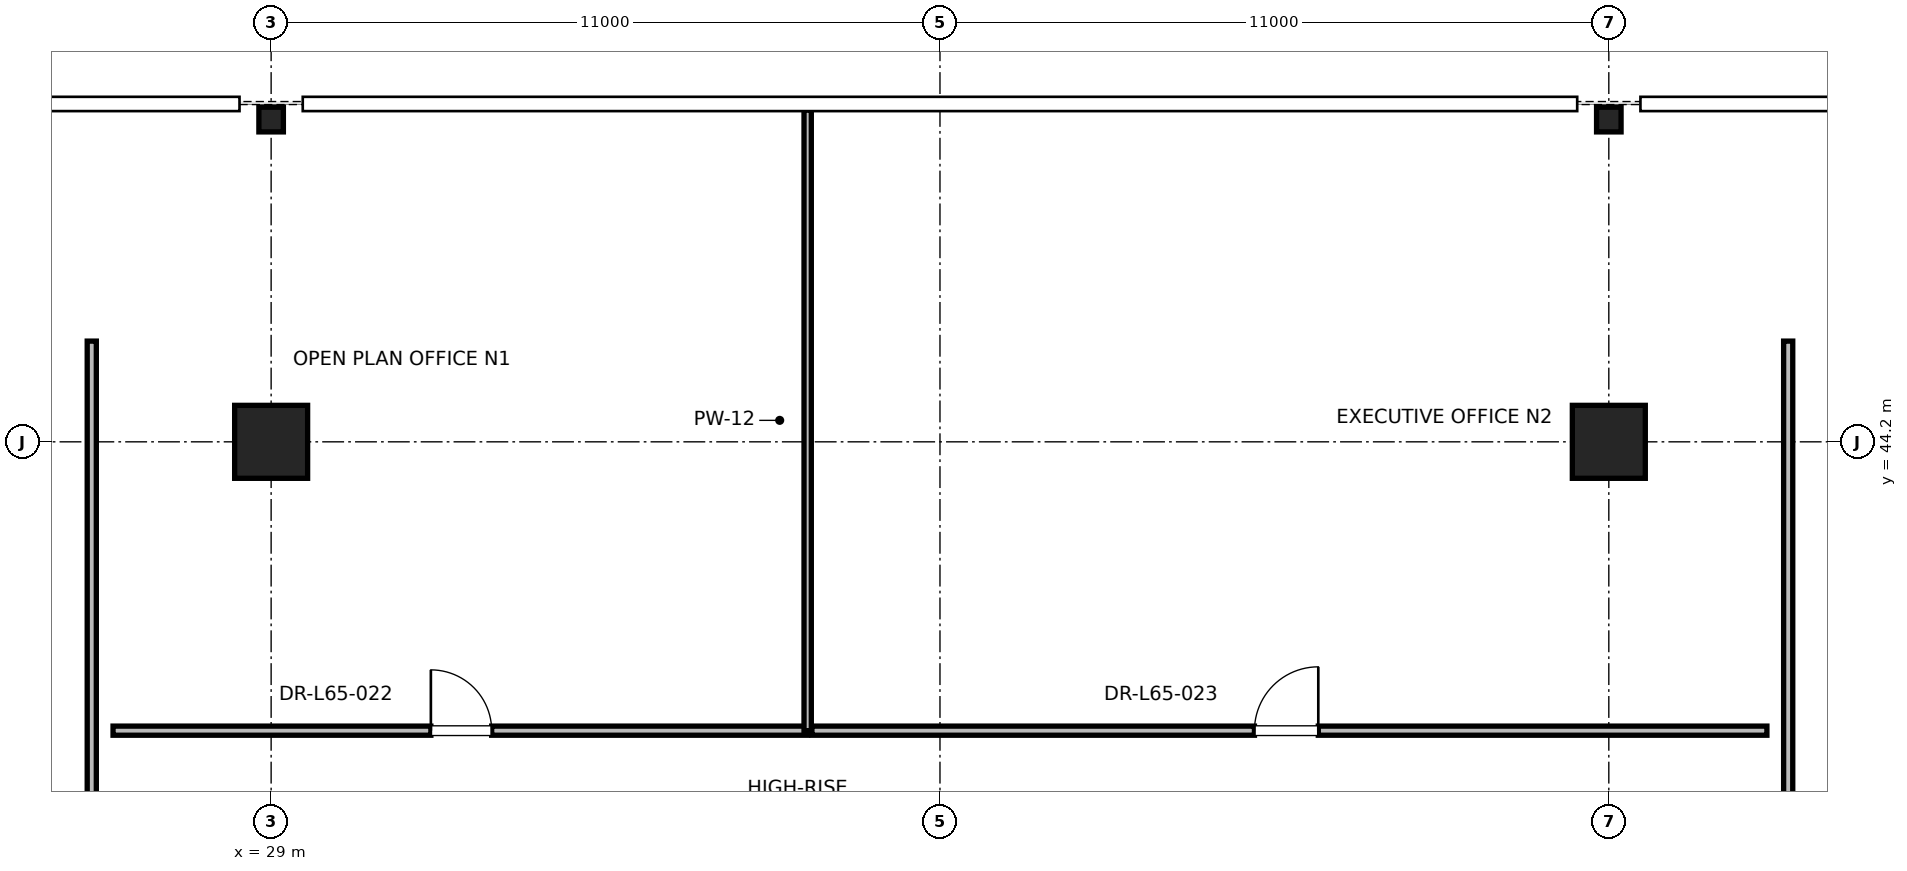
"""IFC4 building model, lengths in metres.
Left out: names, types, materials, properties, quantities, classifications, styles, units other than length and angle.
Written with IfcOpenShell. Run it as: python <this file> out.ifc"""

import sys

from ifc_helpers import new_model, si_unit, direction, frame, frame_2d, origin, origin_2d, place, context, subcontext, project, spatial, rectangle, i_section, extrude, element, fill, save


model = new_model("IFC4")
c1 = context("Model", 3, precision=1e-05, world=origin(), true_north=direction((0.0, 1.0)))
c2 = subcontext(c1, "Body", "Model", "MODEL_VIEW")
j1 = project(units=[si_unit("LENGTHUNIT", "METRE"), si_unit("PLANEANGLEUNIT", "RADIAN")], contexts=[c1])
p1 = place(None, origin())
s1 = spatial("IfcSite", under=j1, at=p1, CompositionType="ELEMENT")
p2 = place(p1, origin())
s2 = spatial("IfcBuilding", under=s1, at=p2, CompositionType="ELEMENT")
p3 = place(p2, frame((0.0, 0.0, 279.2)))
s3 = spatial("IfcBuildingStorey", under=s2, at=p3, CompositionType="ELEMENT", Elevation=279.2)
for number, where, z_axis, x_axis in (
    (1, (29.0, 44.2, 0.0), (0.0, 0.0, 1.0), (1.0, 0.0, 0.0)),
    (2, (51.0, 44.2, 0.0), (0.0, 0.0, 1.0), (1.0, 0.0, 0.0)),
):
    element("IfcColumn", number, at=place(p3, frame(where, z_axis=z_axis, x_axis=x_axis)), inside=s3, PredefinedType="COLUMN", context=c2, shape_type="SweptSolid", body=[
        extrude(rectangle(XDim=1.2, YDim=1.2, at=origin_2d()), origin(), (0.0, 0.0, 1.0), 4.0),
    ])
for number, where, z_axis, x_axis in (
    (3, (29.0, 49.5, 0.0), (0.0, 0.0, 1.0), (1.0, 0.0, 0.0)),
    (4, (51.0, 49.5, 0.0), (0.0, 0.0, 1.0), (1.0, 0.0, 0.0)),
):
    element("IfcColumn", number, at=place(p3, frame(where, z_axis=z_axis, x_axis=x_axis)), inside=s3, PredefinedType="COLUMN", context=c2, shape_type="SweptSolid", body=[
        extrude(i_section(OverallWidth=0.403, OverallDepth=0.406, WebThickness=0.027, FlangeThickness=0.043, FilletRadius=0.015, at=origin_2d()), origin(), (0.0, 0.0, 1.0), 4.0),
    ])
p4 = place(p3, frame((26.4, 39.45, 0.0), z_axis=(0.0, 0.0, 1.0), x_axis=(1.0, 0.0, 0.0)))
e5 = element("IfcWall", 5, at=p4, inside=s3, PredefinedType="PARTITIONING", context=c2, shape_type="SweptSolid", body=[
    extrude(rectangle(XDim=11.424, YDim=0.15, at=frame_2d((5.712, 0.0))), origin(), (0.0, 0.0, 1.0), 2.85),
])
p5 = place(p4, frame((5.227, 0.0, 0.0)))
e6 = element("IfcOpeningElement", 6, at=p5, cuts=e5, PredefinedType="OPENING", context=c2, shape_type="SweptSolid", body=[
    extrude(rectangle(XDim=1.0, YDim=2.15, at=frame_2d((0.5, 1.075))), frame((0.0, 0.075, 0.0), z_axis=(0.0, -1.0, 0.0), x_axis=(1.0, 0.0, 0.0)), (0.0, 0.0, 1.0), 0.15),
])
p6 = place(p3, frame((37.824, 39.45, 0.0), z_axis=(0.0, 0.0, 1.0), x_axis=(0.0, 1.0, 0.0)))
e7 = element("IfcWall", 7, at=p6, inside=s3, PredefinedType="PARTITIONING", context=c2, shape_type="SweptSolid", body=[
    extrude(rectangle(XDim=10.206, YDim=0.12, at=frame_2d((5.103, 0.0))), origin(), (0.0, 0.0, 1.0), 2.415),
])
p7 = place(p3, frame((37.894, 39.45, 0.0), z_axis=(0.0, 0.0, 1.0), x_axis=(1.0, 0.0, 0.0)))
e8 = element("IfcWall", 8, at=p7, inside=s3, PredefinedType="PARTITIONING", context=c2, shape_type="SweptSolid", body=[
    extrude(rectangle(XDim=15.706, YDim=0.15, at=frame_2d((7.853, 0.0))), origin(), (0.0, 0.0, 1.0), 2.85),
])
p8 = place(p7, frame((7.278, 0.0, 0.0)))
e9 = element("IfcOpeningElement", 9, at=p8, cuts=e8, PredefinedType="OPENING", context=c2, shape_type="SweptSolid", body=[
    extrude(rectangle(XDim=1.05, YDim=2.2, at=frame_2d((0.525, 1.1))), frame((0.0, 0.075, 0.0), z_axis=(0.0, -1.0, 0.0), x_axis=(1.0, 0.0, 0.0)), (0.0, 0.0, 1.0), 0.15),
])
p9 = place(p3, frame((26.05, 33.444, 0.0), z_axis=(0.0, 0.0, 1.0), x_axis=(0.0, 1.0, 0.0)))
e10 = element("IfcWall", 10, at=p9, inside=s3, PredefinedType="PARTITIONING", context=c2, shape_type="SweptSolid", body=[
    extrude(rectangle(XDim=12.412, YDim=0.15, at=frame_2d((6.206, 0.0))), origin(), (0.0, 0.0, 1.0), 2.85),
])
p10 = place(p9, frame((0.978, 0.0, 0.0)))
e11 = element("IfcOpeningElement", 11, at=p10, cuts=e10, PredefinedType="OPENING", context=c2, shape_type="SweptSolid", body=[
    extrude(rectangle(XDim=1.0, YDim=2.15, at=frame_2d((0.5, 1.075))), frame((0.0, 0.075, 0.0), z_axis=(0.0, -1.0, 0.0), x_axis=(1.0, 0.0, 0.0)), (0.0, 0.0, 1.0), 0.15),
])
p11 = place(p3, frame((53.95, 34.913, 0.0), z_axis=(0.0, 0.0, 1.0), x_axis=(0.0, 1.0, 0.0)))
e12 = element("IfcWall", 12, at=p11, inside=s3, PredefinedType="PARTITIONING", context=c2, shape_type="SweptSolid", body=[
    extrude(rectangle(XDim=10.944, YDim=0.15, at=frame_2d((5.472, 0.0))), origin(), (0.0, 0.0, 1.0), 2.85),
])
p12 = place(p11, frame((0.14, 0.0, 0.0)))
e13 = element("IfcOpeningElement", 13, at=p12, cuts=e12, PredefinedType="OPENING", context=c2, shape_type="SweptSolid", body=[
    extrude(rectangle(XDim=1.5, YDim=2.25, at=frame_2d((0.75, 1.125))), frame((0.0, 0.075, 0.0), z_axis=(0.0, -1.0, 0.0), x_axis=(1.0, 0.0, 0.0)), (0.0, 0.0, 1.0), 0.15),
])
p13 = place(p5, origin())
e14 = element("IfcDoor", 14, at=p13, inside=s3, OperationType="SINGLE_SWING_LEFT", PredefinedType="DOOR", context=c2, shape_type="SweptSolid", body=[
    extrude(rectangle(XDim=1.0, YDim=2.15, at=frame_2d((0.5, 1.075))), frame((0.0, 0.025, 0.0), z_axis=(0.0, -1.0, 0.0), x_axis=(1.0, 0.0, 0.0)), (0.0, 0.0, 1.0), 0.05),
])
fill(e6, e14)
p14 = place(p8, origin())
e15 = element("IfcDoor", 15, at=p14, inside=s3, OperationType="SINGLE_SWING_RIGHT", PredefinedType="DOOR", context=c2, shape_type="SweptSolid", body=[
    extrude(rectangle(XDim=1.05, YDim=2.2, at=frame_2d((0.525, 1.1))), frame((0.0, 0.025, 0.0), z_axis=(0.0, -1.0, 0.0), x_axis=(1.0, 0.0, 0.0)), (0.0, 0.0, 1.0), 0.05),
])
fill(e9, e15)
save(model, sys.argv[1])
